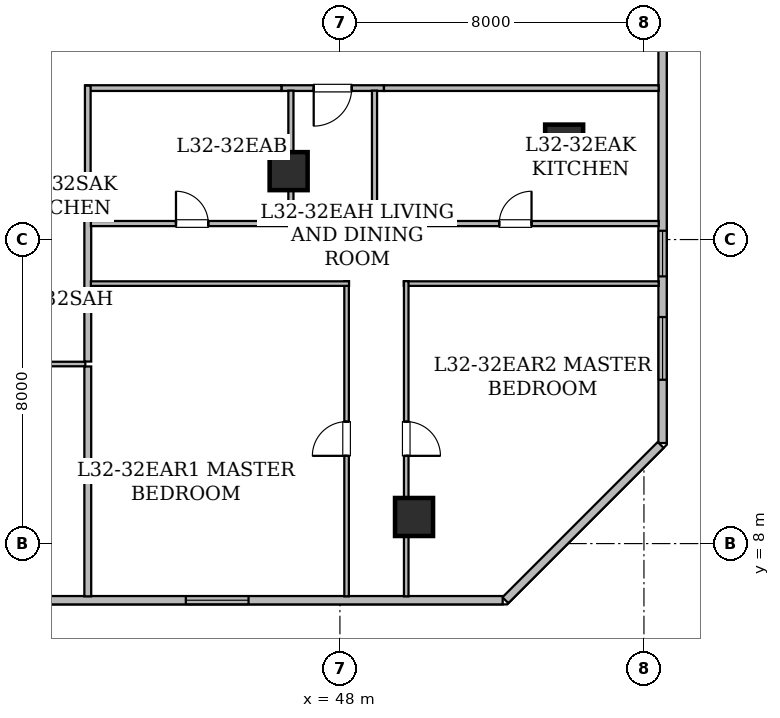
"""IFC4 building model, lengths in metres.
Left out: names, types, materials, properties, quantities, classifications, styles, units other than length and angle.
Written with IfcOpenShell. Run it as: python <this file> out.ifc"""

import sys

from ifc_helpers import new_model, si_unit, direction, frame, frame_2d, origin, origin_2d, place, context, subcontext, project, spatial, rectangle, hollow_rectangle, extrude, element, fill, save


model = new_model("IFC4")
c1 = context("Model", 3, precision=1e-05, world=origin(), true_north=direction((0.0, 1.0)))
c2 = subcontext(c1, "Body", "Model", "MODEL_VIEW")
j1 = project(units=[si_unit("LENGTHUNIT", "METRE"), si_unit("PLANEANGLEUNIT", "RADIAN")], contexts=[c1])
p1 = place(None, origin())
s1 = spatial("IfcSite", under=j1, at=p1, CompositionType="ELEMENT")
p2 = place(p1, origin())
s2 = spatial("IfcBuilding", under=s1, at=p2, CompositionType="ELEMENT")
p3 = place(p2, frame((0.0, 0.0, 127.45)))
s3 = spatial("IfcBuildingStorey", under=s2, at=p3, CompositionType="ELEMENT", Elevation=127.45)
for number, where, z_axis, x_axis in (
    (1, (49.95, 8.7, 0.0), (0.0, 0.0, 1.0), (1.0, 0.0, 0.0)),
    (2, (53.9, 18.525, 0.0), (0.0, 0.0, 1.0), (1.0, 0.0, 0.0)),
    (3, (46.65, 17.8, 0.0), (0.0, 0.0, 1.0), (1.0, 0.0, 0.0)),
):
    element("IfcColumn", number, at=place(p3, frame(where, z_axis=z_axis, x_axis=x_axis)), inside=s3, PredefinedType="COLUMN", context=c2, shape_type="SweptSolid", body=[
        extrude(hollow_rectangle(XDim=1.0, YDim=1.0, WallThickness=0.05, at=origin_2d()), origin(), (0.0, 0.0, 1.0), 3.65),
    ])
p4 = place(p3, frame((56.49, 24.707, 0.0), z_axis=(0.0, 0.0, 1.0), x_axis=(0.0, -1.0, 0.0)))
e4 = element("IfcWall", 4, at=p4, inside=s3, PredefinedType="STANDARD", context=c2, shape_type="SweptSolid", body=[
    extrude(rectangle(XDim=14.061, YDim=0.22, at=frame_2d((7.031, 0.0))), origin(), (0.0, 0.0, 1.0), 3.43),
])
p5 = place(p4, frame((8.476, 0.0, 0.8)))
e5 = element("IfcOpeningElement", 5, at=p5, cuts=e4, PredefinedType="OPENING", context=c2, shape_type="SweptSolid", body=[
    extrude(rectangle(XDim=1.2, YDim=1.5, at=frame_2d((0.6, 0.75))), frame((0.0, 0.12, 0.0), z_axis=(0.0, -1.0, 0.0), x_axis=(1.0, 0.0, 0.0)), (0.0, 0.0, 1.0), 0.24),
])
p6 = place(p4, frame((10.746, 0.0, 0.85)))
e6 = element("IfcOpeningElement", 6, at=p6, cuts=e4, PredefinedType="OPENING", context=c2, shape_type="SweptSolid", body=[
    extrude(rectangle(XDim=1.65, YDim=1.55, at=frame_2d((0.825, 0.775))), frame((0.0, 0.12, 0.0), z_axis=(0.0, -1.0, 0.0), x_axis=(1.0, 0.0, 0.0)), (0.0, 0.0, 1.0), 0.24),
])
p7 = place(p3, frame((56.44, 10.596, 0.0), z_axis=(0.0, 0.0, 1.0), x_axis=(-0.707106781187, -0.707106781187, 0.0)))
e7 = element("IfcWall", 7, at=p7, inside=s3, PredefinedType="STANDARD", context=c2, shape_type="SweptSolid", body=[
    extrude(rectangle(XDim=5.778, YDim=0.22, at=frame_2d((2.889, 0.0))), origin(), (0.0, 0.0, 1.0), 3.43),
])
p8 = place(p3, frame((52.283, 6.51, 0.0), z_axis=(0.0, 0.0, 1.0), x_axis=(-1.0, 0.0, 0.0)))
e8 = element("IfcWall", 8, at=p8, inside=s3, PredefinedType="STANDARD", context=c2, shape_type="SweptSolid", body=[
    extrude(rectangle(XDim=38.568, YDim=0.22, at=frame_2d((19.284, 0.0))), origin(), (0.0, 0.0, 1.0), 3.43),
])
p9 = place(p8, frame((20.408, 0.0, 0.85)))
e9 = element("IfcOpeningElement", 9, at=p9, cuts=e8, PredefinedType="OPENING", context=c2, shape_type="SweptSolid", body=[
    extrude(rectangle(XDim=1.65, YDim=1.55, at=frame_2d((0.825, 0.775))), frame((0.0, 0.12, 0.0), z_axis=(0.0, -1.0, 0.0), x_axis=(1.0, 0.0, 0.0)), (0.0, 0.0, 1.0), 0.24),
])
p10 = place(p8, frame((35.483, 0.0, 0.85)))
e10 = element("IfcOpeningElement", 10, at=p10, cuts=e8, PredefinedType="OPENING", context=c2, shape_type="SweptSolid", body=[
    extrude(rectangle(XDim=1.65, YDim=1.55, at=frame_2d((0.825, 0.775))), frame((0.0, 0.12, 0.0), z_axis=(0.0, -1.0, 0.0), x_axis=(1.0, 0.0, 0.0)), (0.0, 0.0, 1.0), 0.24),
])
p11 = place(p8, frame((25.888, 0.0, 0.85)))
e11 = element("IfcOpeningElement", 11, at=p11, cuts=e8, PredefinedType="OPENING", context=c2, shape_type="SweptSolid", body=[
    extrude(rectangle(XDim=1.65, YDim=1.55, at=frame_2d((0.825, 0.775))), frame((0.0, 0.12, 0.0), z_axis=(0.0, -1.0, 0.0), x_axis=(1.0, 0.0, 0.0)), (0.0, 0.0, 1.0), 0.24),
])
p12 = place(p8, frame((28.168, 0.0, 0.8)))
e12 = element("IfcOpeningElement", 12, at=p12, cuts=e8, PredefinedType="OPENING", context=c2, shape_type="SweptSolid", body=[
    extrude(rectangle(XDim=1.2, YDim=1.5, at=frame_2d((0.6, 0.75))), frame((0.0, 0.12, 0.0), z_axis=(0.0, -1.0, 0.0), x_axis=(1.0, 0.0, 0.0)), (0.0, 0.0, 1.0), 0.24),
])
p13 = place(p8, frame((31.371, 0.0, 0.85)))
e13 = element("IfcOpeningElement", 13, at=p13, cuts=e8, PredefinedType="OPENING", context=c2, shape_type="SweptSolid", body=[
    extrude(rectangle(XDim=1.65, YDim=1.55, at=frame_2d((0.825, 0.775))), frame((0.0, 0.12, 0.0), z_axis=(0.0, -1.0, 0.0), x_axis=(1.0, 0.0, 0.0)), (0.0, 0.0, 1.0), 0.24),
])
p14 = place(p8, frame((13.143, 0.0, 0.85)))
e14 = element("IfcOpeningElement", 14, at=p14, cuts=e8, PredefinedType="OPENING", context=c2, shape_type="SweptSolid", body=[
    extrude(rectangle(XDim=1.65, YDim=1.55, at=frame_2d((0.825, 0.775))), frame((0.0, 0.12, 0.0), z_axis=(0.0, -1.0, 0.0), x_axis=(1.0, 0.0, 0.0)), (0.0, 0.0, 1.0), 0.24),
])
p15 = place(p8, frame((6.688, 0.0, 0.85)))
e15 = element("IfcOpeningElement", 15, at=p15, cuts=e8, PredefinedType="OPENING", context=c2, shape_type="SweptSolid", body=[
    extrude(rectangle(XDim=1.65, YDim=1.55, at=frame_2d((0.825, 0.775))), frame((0.0, 0.12, 0.0), z_axis=(0.0, -1.0, 0.0), x_axis=(1.0, 0.0, 0.0)), (0.0, 0.0, 1.0), 0.24),
])
p16 = place(p3, frame((41.3, 16.835, 0.0), z_axis=(0.0, 0.0, 1.0), x_axis=(-1.0, 0.0, 0.0)))
e16 = element("IfcWall", 16, at=p16, inside=s3, PredefinedType="STANDARD", context=c2, shape_type="SweptSolid", body=[
    extrude(rectangle(XDim=1.636, YDim=0.15, at=frame_2d((0.818, 0.0))), origin(), (0.0, 0.0, 1.0), 3.43),
])
p17 = place(p3, frame((49.159, 19.985, 0.0), z_axis=(0.0, 0.0, 1.0), x_axis=(-1.0, 0.0, 0.0)))
e17 = element("IfcWall", 17, at=p17, inside=s3, PredefinedType="STANDARD", context=c2, shape_type="SweptSolid", body=[
    extrude(rectangle(XDim=2.698, YDim=0.15, at=frame_2d((1.349, 0.0))), origin(), (0.0, 0.0, 1.0), 2.647),
])
p18 = place(p17, frame((0.849, 0.0, 0.0)))
e18 = element("IfcOpeningElement", 18, at=p18, cuts=e17, PredefinedType="OPENING", context=c2, shape_type="SweptSolid", body=[
    extrude(rectangle(XDim=1.0, YDim=2.15, at=frame_2d((0.5, 1.075))), frame((0.0, 0.085, 0.0), z_axis=(0.0, -1.0, 0.0), x_axis=(1.0, 0.0, 0.0)), (0.0, 0.0, 1.0), 0.17),
])
p19 = place(p3, frame((46.461, 19.985, 0.0), z_axis=(0.0, 0.0, 1.0), x_axis=(-1.0, 0.0, 0.0)))
e19 = element("IfcWall", 19, at=p19, inside=s3, PredefinedType="STANDARD", context=c2, shape_type="SweptSolid", body=[
    extrude(rectangle(XDim=5.161, YDim=0.15, at=frame_2d((2.581, 0.0))), origin(), (0.0, 0.0, 1.0), 2.647),
])
p20 = place(p3, frame((41.365, 20.05, 0.0), z_axis=(0.0, 0.0, 1.0), x_axis=(0.0, -1.0, 0.0)))
e20 = element("IfcWall", 20, at=p20, inside=s3, PredefinedType="STANDARD", context=c2, shape_type="SweptSolid", body=[
    extrude(rectangle(XDim=3.15, YDim=0.15, at=frame_2d((1.575, 0.0))), origin(), (0.0, 0.0, 1.0), 2.647),
])
p21 = place(p3, frame((56.388, 19.985, 0.0), z_axis=(0.0, 0.0, 1.0), x_axis=(-1.0, 0.0, 0.0)))
e21 = element("IfcWall", 21, at=p21, inside=s3, PredefinedType="STANDARD", context=c2, shape_type="SweptSolid", body=[
    extrude(rectangle(XDim=7.229, YDim=0.15, at=frame_2d((3.615, 0.0))), origin(), (0.0, 0.0, 1.0), 2.876),
])
p22 = place(p3, frame((39.35, 14.305, 0.0), z_axis=(0.0, 0.0, 1.0), x_axis=(1.0, 0.0, 0.0)))
e22 = element("IfcWall", 22, at=p22, inside=s3, PredefinedType="PARTITIONING", context=c2, shape_type="SweptSolid", body=[
    extrude(rectangle(XDim=1.95, YDim=0.135, at=frame_2d((0.975, 0.0))), origin(), (0.0, 0.0, 1.0), 3.43),
])
p23 = place(p3, frame((41.3, 12.725, 0.0), z_axis=(0.0, 0.0, 1.0), x_axis=(-1.0, 0.0, 0.0)))
e23 = element("IfcWall", 23, at=p23, inside=s3, PredefinedType="PARTITIONING", context=c2, shape_type="SweptSolid", body=[
    extrude(rectangle(XDim=5.981, YDim=0.12, at=frame_2d((2.99, 0.0))), origin(), (0.0, 0.0, 1.0), 2.647),
])
p24 = place(p23, frame((2.54, 0.0, 0.0)))
e24 = element("IfcOpeningElement", 24, at=p24, cuts=e23, PredefinedType="OPENING", context=c2, shape_type="SweptSolid", body=[
    extrude(rectangle(XDim=0.9, YDim=2.1, at=frame_2d((0.45, 1.05))), frame((0.0, 0.07, 0.0), z_axis=(0.0, -1.0, 0.0), x_axis=(1.0, 0.0, 0.0)), (0.0, 0.0, 1.0), 0.14),
])
p25 = place(p3, frame((41.365, 14.24, 0.0), z_axis=(0.0, 0.0, 1.0), x_axis=(0.0, -1.0, 0.0)))
e25 = element("IfcWall", 25, at=p25, inside=s3, PredefinedType="STANDARD", context=c2, shape_type="SweptSolid", body=[
    extrude(rectangle(XDim=1.45, YDim=0.18, at=frame_2d((0.725, 0.0))), origin(), (0.0, 0.0, 1.0), 3.43),
])
p26 = place(p3, frame((41.365, 16.67, 0.0), z_axis=(0.0, 0.0, 1.0), x_axis=(0.0, -1.0, 0.0)))
e26 = element("IfcWall", 26, at=p26, inside=s3, PredefinedType="STANDARD", context=c2, shape_type="SweptSolid", body=[
    extrude(rectangle(XDim=2.078, YDim=0.18, at=frame_2d((1.039, 0.0))), origin(), (0.0, 0.0, 1.0), 3.43),
])
p27 = place(p3, frame((41.365, 14.592, 0.0), z_axis=(0.0, 0.0, 1.0), x_axis=(0.0, -1.0, 0.0)))
e27 = element("IfcWall", 27, at=p27, inside=s3, PredefinedType="STANDARD", context=c2, shape_type="SweptSolid", body=[
    extrude(rectangle(XDim=0.222, YDim=0.18, at=frame_2d((0.111, 0.0))), origin(), (0.0, 0.0, 1.0), 3.43),
])
p28 = place(p3, frame((41.365, 12.66, 0.0), z_axis=(0.0, 0.0, 1.0), x_axis=(0.0, -1.0, 0.0)))
e28 = element("IfcWall", 28, at=p28, inside=s3, PredefinedType="STANDARD", context=c2, shape_type="SweptSolid", body=[
    extrude(rectangle(XDim=6.048, YDim=0.18, at=frame_2d((3.024, 0.0))), origin(), (0.0, 0.0, 1.0), 2.876),
])
p29 = place(p3, frame((41.447, 16.421, 0.0), z_axis=(0.0, 0.0, 1.0), x_axis=(1.0, 0.0, 0.0)))
e29 = element("IfcWall", 29, at=p29, inside=s3, PredefinedType="PARTITIONING", context=c2, shape_type="SweptSolid", body=[
    extrude(rectangle(XDim=5.328, YDim=0.135, at=frame_2d((2.664, 0.0))), origin(), (0.0, 0.0, 1.0), 3.43),
])
p30 = place(p29, frame((2.239, 0.0, 0.0)))
e30 = element("IfcOpeningElement", 30, at=p30, cuts=e29, PredefinedType="OPENING", context=c2, shape_type="SweptSolid", body=[
    extrude(rectangle(XDim=0.85, YDim=2.1, at=frame_2d((0.425, 1.05))), frame((0.0, 0.077, 0.0), z_axis=(0.0, -1.0, 0.0), x_axis=(1.0, 0.0, 0.0)), (0.0, 0.0, 1.0), 0.155),
])
for number, where, z_axis, x_axis in (
    (31, (46.71, 16.356, 0.0), (0.0, 0.0, 1.0), (0.0, 1.0, 0.0)),
    (32, (48.91, 19.918, 0.0), (0.0, 0.0, 1.0), (0.0, -1.0, 0.0)),
):
    element("IfcWall", number, at=place(p3, frame(where, z_axis=z_axis, x_axis=x_axis)), inside=s3, PredefinedType="PARTITIONING", context=c2, shape_type="SweptSolid", body=[
        extrude(rectangle(XDim=3.562, YDim=0.135, at=frame_2d((1.781, 0.0))), origin(), (0.0, 0.0, 1.0), 2.647),
    ])
p31 = place(p3, frame((48.845, 16.421, 0.0), z_axis=(0.0, 0.0, 1.0), x_axis=(1.0, 0.0, 0.0)))
e33 = element("IfcWall", 33, at=p31, inside=s3, PredefinedType="PARTITIONING", context=c2, shape_type="SweptSolid", body=[
    extrude(rectangle(XDim=7.543, YDim=0.135, at=frame_2d((3.771, 0.0))), origin(), (0.0, 0.0, 1.0), 2.876),
])
p32 = place(p31, frame((3.347, 0.0, 0.0)))
e34 = element("IfcOpeningElement", 34, at=p32, cuts=e33, PredefinedType="OPENING", context=c2, shape_type="SweptSolid", body=[
    extrude(rectangle(XDim=0.85, YDim=2.1, at=frame_2d((0.425, 1.05))), frame((0.0, 0.077, 0.0), z_axis=(0.0, -1.0, 0.0), x_axis=(1.0, 0.0, 0.0)), (0.0, 0.0, 1.0), 0.155),
])
p33 = place(p3, frame((48.175, 6.612, 0.0), z_axis=(0.0, 0.0, 1.0), x_axis=(0.0, 1.0, 0.0)))
e35 = element("IfcWall", 35, at=p33, inside=s3, PredefinedType="PARTITIONING", context=c2, shape_type="SweptSolid", body=[
    extrude(rectangle(XDim=8.294, YDim=0.12, at=frame_2d((4.147, 0.0))), origin(), (0.0, 0.0, 1.0), 2.647),
])
p34 = place(p33, frame((3.697, 0.0, 0.0)))
e36 = element("IfcOpeningElement", 36, at=p34, cuts=e35, PredefinedType="OPENING", context=c2, shape_type="SweptSolid", body=[
    extrude(rectangle(XDim=0.9, YDim=2.1, at=frame_2d((0.45, 1.05))), frame((0.0, 0.07, 0.0), z_axis=(0.0, -1.0, 0.0), x_axis=(1.0, 0.0, 0.0)), (0.0, 0.0, 1.0), 0.14),
])
p35 = place(p3, frame((48.24, 14.841, 0.0), z_axis=(0.0, 0.0, 1.0), x_axis=(-1.0, 0.0, 0.0)))
e37 = element("IfcWall", 37, at=p35, inside=s3, PredefinedType="PARTITIONING", context=c2, shape_type="SweptSolid", body=[
    extrude(rectangle(XDim=6.793, YDim=0.12, at=frame_2d((3.396, 0.0))), origin(), (0.0, 0.0, 1.0), 2.647),
])
p36 = place(p3, frame((56.388, 14.841, 0.0), z_axis=(0.0, 0.0, 1.0), x_axis=(-1.0, 0.0, 0.0)))
e38 = element("IfcWall", 38, at=p36, inside=s3, PredefinedType="PARTITIONING", context=c2, shape_type="SweptSolid", body=[
    extrude(rectangle(XDim=6.708, YDim=0.12, at=frame_2d((3.354, 0.0))), origin(), (0.0, 0.0, 1.0), 2.876),
])
p37 = place(p3, frame((49.745, 14.906, 0.0), z_axis=(0.0, 0.0, 1.0), x_axis=(0.0, -1.0, 0.0)))
e39 = element("IfcWall", 39, at=p37, inside=s3, PredefinedType="PARTITIONING", context=c2, shape_type="SweptSolid", body=[
    extrude(rectangle(XDim=8.294, YDim=0.12, at=frame_2d((4.147, 0.0))), origin(), (0.0, 0.0, 1.0), 2.647),
])
p38 = place(p37, frame((3.697, 0.0, 0.0)))
e40 = element("IfcOpeningElement", 40, at=p38, cuts=e39, PredefinedType="OPENING", context=c2, shape_type="SweptSolid", body=[
    extrude(rectangle(XDim=0.9, YDim=2.1, at=frame_2d((0.45, 1.05))), frame((0.0, 0.07, 0.0), z_axis=(0.0, -1.0, 0.0), x_axis=(1.0, 0.0, 0.0)), (0.0, 0.0, 1.0), 0.14),
])
p39 = place(p5, origin())
e41 = element("IfcWindow", 41, at=p39, inside=s3, PartitioningType="SINGLE_PANEL", PredefinedType="WINDOW", context=c2, shape_type="SweptSolid", body=[
    extrude(rectangle(XDim=1.2, YDim=1.5, at=frame_2d((0.6, 0.75))), frame((0.0, 0.03, 0.0), z_axis=(0.0, -1.0, 0.0), x_axis=(1.0, 0.0, 0.0)), (0.0, 0.0, 1.0), 0.06),
])
fill(e5, e41)
p40 = place(p15, origin())
e42 = element("IfcWindow", 42, at=p40, inside=s3, PartitioningType="SINGLE_PANEL", PredefinedType="WINDOW", context=c2, shape_type="SweptSolid", body=[
    extrude(rectangle(XDim=1.65, YDim=1.55, at=frame_2d((0.825, 0.775))), frame((0.0, 0.03, 0.0), z_axis=(0.0, -1.0, 0.0), x_axis=(1.0, 0.0, 0.0)), (0.0, 0.0, 1.0), 0.06),
])
fill(e15, e42)
p41 = place(p6, origin())
e43 = element("IfcWindow", 43, at=p41, inside=s3, PartitioningType="SINGLE_PANEL", PredefinedType="WINDOW", context=c2, shape_type="SweptSolid", body=[
    extrude(rectangle(XDim=1.65, YDim=1.55, at=frame_2d((0.825, 0.775))), frame((0.0, 0.03, 0.0), z_axis=(0.0, -1.0, 0.0), x_axis=(1.0, 0.0, 0.0)), (0.0, 0.0, 1.0), 0.06),
])
fill(e6, e43)
p42 = place(p18, origin())
e44 = element("IfcDoor", 44, at=p42, inside=s3, OperationType="SINGLE_SWING_RIGHT", PredefinedType="DOOR", context=c2, shape_type="SweptSolid", body=[
    extrude(rectangle(XDim=1.0, YDim=2.15, at=frame_2d((0.5, 1.075))), frame((0.0, 0.025, 0.0), z_axis=(0.0, -1.0, 0.0), x_axis=(1.0, 0.0, 0.0)), (0.0, 0.0, 1.0), 0.05),
])
fill(e18, e44)
p43 = place(p30, origin())
e45 = element("IfcDoor", 45, at=p43, inside=s3, OperationType="SINGLE_SWING_LEFT", PredefinedType="DOOR", context=c2, shape_type="SweptSolid", body=[
    extrude(rectangle(XDim=0.85, YDim=2.1, at=frame_2d((0.425, 1.05))), frame((0.0, 0.025, 0.0), z_axis=(0.0, -1.0, 0.0), x_axis=(1.0, 0.0, 0.0)), (0.0, 0.0, 1.0), 0.05),
])
fill(e30, e45)
p44 = place(p32, origin())
e46 = element("IfcDoor", 46, at=p44, inside=s3, OperationType="SINGLE_SWING_RIGHT", PredefinedType="DOOR", context=c2, shape_type="SweptSolid", body=[
    extrude(rectangle(XDim=0.85, YDim=2.1, at=frame_2d((0.425, 1.05))), frame((0.0, 0.025, 0.0), z_axis=(0.0, -1.0, 0.0), x_axis=(1.0, 0.0, 0.0)), (0.0, 0.0, 1.0), 0.05),
])
fill(e34, e46)
p45 = place(p34, origin())
e47 = element("IfcDoor", 47, at=p45, inside=s3, OperationType="SINGLE_SWING_LEFT", PredefinedType="DOOR", context=c2, shape_type="SweptSolid", body=[
    extrude(rectangle(XDim=0.9, YDim=2.1, at=frame_2d((0.45, 1.05))), frame((0.0, 0.025, 0.0), z_axis=(0.0, -1.0, 0.0), x_axis=(1.0, 0.0, 0.0)), (0.0, 0.0, 1.0), 0.05),
])
fill(e36, e47)
p46 = place(p38, origin())
e48 = element("IfcDoor", 48, at=p46, inside=s3, OperationType="SINGLE_SWING_RIGHT", PredefinedType="DOOR", context=c2, shape_type="SweptSolid", body=[
    extrude(rectangle(XDim=0.9, YDim=2.1, at=frame_2d((0.45, 1.05))), frame((0.0, 0.025, 0.0), z_axis=(0.0, -1.0, 0.0), x_axis=(1.0, 0.0, 0.0)), (0.0, 0.0, 1.0), 0.05),
])
fill(e40, e48)
save(model, sys.argv[1])
